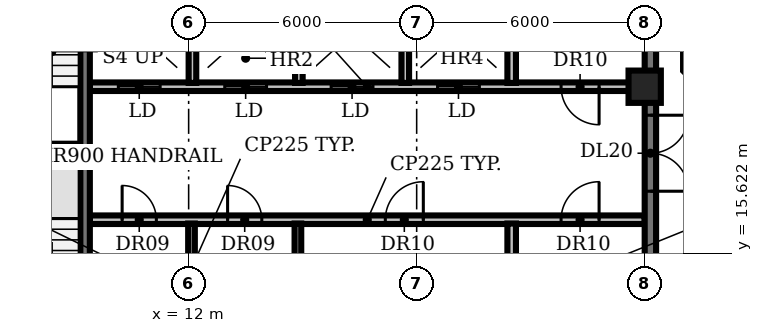
"""IFC4 building model, lengths in metres.
Left out: names, types, materials, properties, quantities, classifications, styles, units other than length and angle.
Written with IfcOpenShell. Run it as: python <this file> out.ifc"""

import sys

from ifc_helpers import new_model, si_unit, direction, frame, frame_2d, origin, origin_2d, place, context, subcontext, project, spatial, rectangle, circle, extrude, element, fill, save


model = new_model("IFC4")
c1 = context("Model", 3, precision=1e-05, world=origin(), true_north=direction((0.0, 1.0)))
c2 = subcontext(c1, "Body", "Model", "MODEL_VIEW")
j1 = project(units=[si_unit("LENGTHUNIT", "METRE"), si_unit("PLANEANGLEUNIT", "RADIAN")], contexts=[c1])
p1 = place(None, origin())
s1 = spatial("IfcSite", under=j1, at=p1, CompositionType="ELEMENT")
p2 = place(p1, origin())
s2 = spatial("IfcBuilding", under=s1, at=p2, CompositionType="ELEMENT")
p3 = place(p2, frame((0.0, 0.0, 272.6)))
s3 = spatial("IfcBuildingStorey", under=s2, at=p3, CompositionType="ELEMENT", Elevation=272.6)
p4 = place(p3, frame((24.0, 20.0, 0.0), z_axis=(0.0, 0.0, 1.0), x_axis=(1.0, 0.0, 0.0)))
e1 = element("IfcColumn", 1, at=p4, inside=s3, PredefinedType="COLUMN", context=c2, shape_type="SweptSolid", body=[
    extrude(circle(Radius=0.425, at=origin_2d()), origin(), (0.0, 0.0, 1.0), 3.85),
])
p5 = place(p3, frame((9.4, 16.5, 0.0), z_axis=(0.0, 0.0, 1.0), x_axis=(1.0, 0.0, 0.0)))
e2 = element("IfcWall", 2, at=p5, inside=s3, PredefinedType="PARTITIONING", context=c2, shape_type="SweptSolid", body=[
    extrude(rectangle(XDim=14.6, YDim=0.225, at=frame_2d((7.3, 0.0))), origin(), (0.0, 0.0, 1.0), 3.85),
])
p6 = place(p5, frame((0.85, 0.0, 0.0)))
e3 = element("IfcOpeningElement", 3, at=p6, cuts=e2, PredefinedType="OPENING", context=c2, shape_type="SweptSolid", body=[
    extrude(rectangle(XDim=0.9, YDim=2.1, at=frame_2d((0.45, 1.05))), frame((0.0, 0.123, 0.0), z_axis=(0.0, -1.0, 0.0), x_axis=(1.0, 0.0, 0.0)), (0.0, 0.0, 1.0), 0.245),
])
p7 = place(p5, frame((3.625, 0.0, 0.0)))
e4 = element("IfcOpeningElement", 4, at=p7, cuts=e2, PredefinedType="OPENING", context=c2, shape_type="SweptSolid", body=[
    extrude(rectangle(XDim=0.9, YDim=2.1, at=frame_2d((0.45, 1.05))), frame((0.0, 0.123, 0.0), z_axis=(0.0, -1.0, 0.0), x_axis=(1.0, 0.0, 0.0)), (0.0, 0.0, 1.0), 0.245),
])
p8 = place(p5, frame((7.775, 0.0, 0.0)))
e5 = element("IfcOpeningElement", 5, at=p8, cuts=e2, PredefinedType="OPENING", context=c2, shape_type="SweptSolid", body=[
    extrude(rectangle(XDim=1.0, YDim=2.1, at=frame_2d((0.5, 1.05))), frame((0.0, 0.123, 0.0), z_axis=(0.0, -1.0, 0.0), x_axis=(1.0, 0.0, 0.0)), (0.0, 0.0, 1.0), 0.245),
])
p9 = place(p5, frame((12.4, 0.0, 0.0)))
e6 = element("IfcOpeningElement", 6, at=p9, cuts=e2, PredefinedType="OPENING", context=c2, shape_type="SweptSolid", body=[
    extrude(rectangle(XDim=1.0, YDim=2.1, at=frame_2d((0.5, 1.05))), frame((0.0, 0.123, 0.0), z_axis=(0.0, -1.0, 0.0), x_axis=(1.0, 0.0, 0.0)), (0.0, 0.0, 1.0), 0.245),
])
p10 = place(p3, frame((6.0, 18.375, 0.0), z_axis=(0.0, 0.0, 1.0), x_axis=(1.0, 0.0, 0.0)))
e7 = element("IfcWall", 7, at=p10, inside=s3, PredefinedType="SHEAR", context=c2, shape_type="SweptSolid", body=[
    extrude(rectangle(XDim=3.15, YDim=0.25, at=frame_2d((1.575, 0.0))), origin(), (0.0, 0.0, 1.0), 3.85),
])
p11 = place(p3, frame((24.0, 20.0, 0.0), z_axis=(0.0, 0.0, 1.0), x_axis=(-1.0, 0.0, 0.0)))
e8 = element("IfcWall", 8, at=p11, inside=s3, PredefinedType="PARTITIONING", context=c2, shape_type="SweptSolid", body=[
    extrude(rectangle(XDim=14.6, YDim=0.225, at=frame_2d((7.3, 0.0))), origin(), (0.0, 0.0, 1.0), 3.85),
])
p12 = place(p11, frame((12.75, 0.0, 0.0)))
e9 = element("IfcOpeningElement", 9, at=p12, cuts=e8, PredefinedType="OPENING", context=c2, shape_type="SweptSolid", body=[
    extrude(rectangle(XDim=1.1, YDim=2.1, at=frame_2d((0.55, 1.05))), frame((0.0, 0.123, 0.0), z_axis=(0.0, -1.0, 0.0), x_axis=(1.0, 0.0, 0.0)), (0.0, 0.0, 1.0), 0.245),
])
p13 = place(p11, frame((9.95, 0.0, 0.0)))
e10 = element("IfcOpeningElement", 10, at=p13, cuts=e8, PredefinedType="OPENING", context=c2, shape_type="SweptSolid", body=[
    extrude(rectangle(XDim=1.1, YDim=2.1, at=frame_2d((0.55, 1.05))), frame((0.0, 0.123, 0.0), z_axis=(0.0, -1.0, 0.0), x_axis=(1.0, 0.0, 0.0)), (0.0, 0.0, 1.0), 0.245),
])
p14 = place(p11, frame((7.15, 0.0, 0.0)))
e11 = element("IfcOpeningElement", 11, at=p14, cuts=e8, PredefinedType="OPENING", context=c2, shape_type="SweptSolid", body=[
    extrude(rectangle(XDim=1.1, YDim=2.1, at=frame_2d((0.55, 1.05))), frame((0.0, 0.123, 0.0), z_axis=(0.0, -1.0, 0.0), x_axis=(1.0, 0.0, 0.0)), (0.0, 0.0, 1.0), 0.245),
])
p15 = place(p11, frame((4.35, 0.0, 0.0)))
e12 = element("IfcOpeningElement", 12, at=p15, cuts=e8, PredefinedType="OPENING", context=c2, shape_type="SweptSolid", body=[
    extrude(rectangle(XDim=1.1, YDim=2.1, at=frame_2d((0.55, 1.05))), frame((0.0, 0.123, 0.0), z_axis=(0.0, -1.0, 0.0), x_axis=(1.0, 0.0, 0.0)), (0.0, 0.0, 1.0), 0.245),
])
p16 = place(p11, frame((1.2, 0.0, 0.0)))
e13 = element("IfcOpeningElement", 13, at=p16, cuts=e8, PredefinedType="OPENING", context=c2, shape_type="SweptSolid", body=[
    extrude(rectangle(XDim=1.0, YDim=2.1, at=frame_2d((0.5, 1.05))), frame((0.0, 0.123, 0.0), z_axis=(0.0, -1.0, 0.0), x_axis=(1.0, 0.0, 0.0)), (0.0, 0.0, 1.0), 0.245),
])
p17 = place(p3, frame((9.275, 18.375, 0.0), z_axis=(0.0, 0.0, 1.0), x_axis=(0.0, -1.0, 0.0)))
e14 = element("IfcWall", 14, at=p17, inside=s3, PredefinedType="SHEAR", context=c2, shape_type="SweptSolid", body=[
    extrude(rectangle(XDim=6.55, YDim=0.25, at=frame_2d((3.275, 0.0))), origin(), (0.0, 0.0, 1.0), 3.85),
])
p18 = place(p17, frame((5.075, 0.0, 0.0)))
e15 = element("IfcOpeningElement", 15, at=p18, cuts=e14, PredefinedType="OPENING", context=c2, shape_type="SweptSolid", body=[
    extrude(rectangle(XDim=1.0, YDim=2.1, at=frame_2d((0.5, 1.05))), frame((0.0, 0.135, 0.0), z_axis=(0.0, -1.0, 0.0), x_axis=(1.0, 0.0, 0.0)), (0.0, 0.0, 1.0), 0.27),
])
p19 = place(p3, frame((9.275, 18.375, 0.0), z_axis=(0.0, 0.0, 1.0), x_axis=(0.0, 1.0, 0.0)))
e16 = element("IfcWall", 16, at=p19, inside=s3, PredefinedType="SHEAR", context=c2, shape_type="SweptSolid", body=[
    extrude(rectangle(XDim=6.425, YDim=0.25, at=frame_2d((3.212, 0.0))), origin(), (0.0, 0.0, 1.0), 3.85),
])
p20 = place(p3, frame((12.075, 13.8, 0.0), z_axis=(0.0, 0.0, 1.0), x_axis=(0.0, 1.0, 0.0)))
e17 = element("IfcWall", 17, at=p20, inside=s3, PredefinedType="PARTITIONING", context=c2, shape_type="SweptSolid", body=[
    extrude(rectangle(XDim=2.6, YDim=0.175, at=frame_2d((1.3, 0.0))), origin(), (0.0, 0.0, 1.0), 3.85),
])
p21 = place(p3, frame((12.1, 20.1, 0.0), z_axis=(0.0, 0.0, 1.0), x_axis=(0.0, 1.0, 0.0)))
e18 = element("IfcWall", 18, at=p21, inside=s3, PredefinedType="SOLIDWALL", context=c2, shape_type="SweptSolid", body=[
    extrude(rectangle(XDim=2.6, YDim=0.2, at=frame_2d((1.3, 0.0))), origin(), (0.0, 0.0, 1.0), 3.85),
])
p22 = place(p3, frame((14.875, 13.8, 0.0), z_axis=(0.0, 0.0, 1.0), x_axis=(0.0, 1.0, 0.0)))
e19 = element("IfcWall", 19, at=p22, inside=s3, PredefinedType="PARTITIONING", context=c2, shape_type="SweptSolid", body=[
    extrude(rectangle(XDim=2.6, YDim=0.175, at=frame_2d((1.3, 0.0))), origin(), (0.0, 0.0, 1.0), 3.85),
])
for number, where, z_axis, x_axis in (
    (20, (14.9, 20.1, 0.0), (0.0, 0.0, 1.0), (0.0, 1.0, 0.0)),
    (21, (17.7, 20.1, 0.0), (0.0, 0.0, 1.0), (0.0, 1.0, 0.0)),
):
    element("IfcWall", number, at=place(p3, frame(where, z_axis=z_axis, x_axis=x_axis)), inside=s3, PredefinedType="SOLIDWALL", context=c2, shape_type="SweptSolid", body=[
        extrude(rectangle(XDim=2.6, YDim=0.2, at=frame_2d((1.3, 0.0))), origin(), (0.0, 0.0, 1.0), 3.85),
    ])
for number, where, z_axis, x_axis in (
    (22, (20.5, 13.8, 0.0), (0.0, 0.0, 1.0), (0.0, 1.0, 0.0)),
    (23, (20.5, 20.1, 0.0), (0.0, 0.0, 1.0), (0.0, 1.0, 0.0)),
):
    element("IfcWall", number, at=place(p3, frame(where, z_axis=z_axis, x_axis=x_axis)), inside=s3, PredefinedType="PARTITIONING", context=c2, shape_type="SweptSolid", body=[
        extrude(rectangle(XDim=2.6, YDim=0.225, at=frame_2d((1.3, 0.0))), origin(), (0.0, 0.0, 1.0), 3.85),
    ])
p23 = place(p3, frame((24.15, 25.655, 0.0), z_axis=(0.0, 0.0, 1.0), x_axis=(0.0, -1.0, 0.0)))
e24 = element("IfcWall", 24, at=p23, inside=s3, PredefinedType="SHEAR", context=c2, shape_type="SweptSolid", body=[
    extrude(rectangle(XDim=20.555, YDim=0.3, at=frame_2d((10.277, 0.0))), origin(), (0.0, 0.0, 1.0), 3.85),
])
p24 = place(p23, frame((18.505, 0.0, 0.0)))
e25 = element("IfcOpeningElement", 25, at=p24, cuts=e24, PredefinedType="OPENING", context=c2, shape_type="SweptSolid", body=[
    extrude(rectangle(XDim=1.5, YDim=2.1, at=frame_2d((0.75, 1.05))), frame((0.0, 0.16, 0.0), z_axis=(0.0, -1.0, 0.0), x_axis=(1.0, 0.0, 0.0)), (0.0, 0.0, 1.0), 0.32),
])
p25 = place(p23, frame((12.405, 0.0, 0.0)))
e26 = element("IfcOpeningElement", 26, at=p25, cuts=e24, PredefinedType="OPENING", context=c2, shape_type="SweptSolid", body=[
    extrude(rectangle(XDim=0.9, YDim=2.1, at=frame_2d((0.45, 1.05))), frame((0.0, 0.16, 0.0), z_axis=(0.0, -1.0, 0.0), x_axis=(1.0, 0.0, 0.0)), (0.0, 0.0, 1.0), 0.32),
])
p26 = place(p23, frame((6.405, 0.0, 0.0)))
e27 = element("IfcOpeningElement", 27, at=p26, cuts=e24, PredefinedType="OPENING", context=c2, shape_type="SweptSolid", body=[
    extrude(rectangle(XDim=2.0, YDim=2.1, at=frame_2d((1.0, 1.05))), frame((0.0, 0.16, 0.0), z_axis=(0.0, -1.0, 0.0), x_axis=(1.0, 0.0, 0.0)), (0.0, 0.0, 1.0), 0.32),
])
p27 = place(p6, origin())
e28 = element("IfcDoor", 28, at=p27, inside=s3, OperationType="SINGLE_SWING_LEFT", PredefinedType="DOOR", context=c2, shape_type="SweptSolid", body=[
    extrude(rectangle(XDim=0.9, YDim=2.1, at=frame_2d((0.45, 1.05))), frame((0.0, 0.025, 0.0), z_axis=(0.0, -1.0, 0.0), x_axis=(1.0, 0.0, 0.0)), (0.0, 0.0, 1.0), 0.05),
])
fill(e3, e28)
p28 = place(p7, origin())
e29 = element("IfcDoor", 29, at=p28, inside=s3, OperationType="SINGLE_SWING_LEFT", PredefinedType="DOOR", context=c2, shape_type="SweptSolid", body=[
    extrude(rectangle(XDim=0.9, YDim=2.1, at=frame_2d((0.45, 1.05))), frame((0.0, 0.025, 0.0), z_axis=(0.0, -1.0, 0.0), x_axis=(1.0, 0.0, 0.0)), (0.0, 0.0, 1.0), 0.05),
])
fill(e4, e29)
p29 = place(p8, origin())
e30 = element("IfcDoor", 30, at=p29, inside=s3, OperationType="SINGLE_SWING_RIGHT", PredefinedType="DOOR", context=c2, shape_type="SweptSolid", body=[
    extrude(rectangle(XDim=1.0, YDim=2.1, at=frame_2d((0.5, 1.05))), frame((0.0, 0.025, 0.0), z_axis=(0.0, -1.0, 0.0), x_axis=(1.0, 0.0, 0.0)), (0.0, 0.0, 1.0), 0.05),
])
fill(e5, e30)
p30 = place(p9, origin())
e31 = element("IfcDoor", 31, at=p30, inside=s3, OperationType="SINGLE_SWING_RIGHT", PredefinedType="DOOR", context=c2, shape_type="SweptSolid", body=[
    extrude(rectangle(XDim=1.0, YDim=2.1, at=frame_2d((0.5, 1.05))), frame((0.0, 0.025, 0.0), z_axis=(0.0, -1.0, 0.0), x_axis=(1.0, 0.0, 0.0)), (0.0, 0.0, 1.0), 0.05),
])
fill(e6, e31)
p31 = place(p12, origin())
e32 = element("IfcDoor", 32, at=p31, inside=s3, OperationType="DOUBLE_DOOR_SLIDING", PredefinedType="DOOR", context=c2, shape_type="SweptSolid", body=[
    extrude(rectangle(XDim=1.1, YDim=2.1, at=frame_2d((0.55, 1.05))), frame((0.0, 0.025, 0.0), z_axis=(0.0, -1.0, 0.0), x_axis=(1.0, 0.0, 0.0)), (0.0, 0.0, 1.0), 0.05),
])
fill(e9, e32)
p32 = place(p13, origin())
e33 = element("IfcDoor", 33, at=p32, inside=s3, OperationType="DOUBLE_DOOR_SLIDING", PredefinedType="DOOR", context=c2, shape_type="SweptSolid", body=[
    extrude(rectangle(XDim=1.1, YDim=2.1, at=frame_2d((0.55, 1.05))), frame((0.0, 0.025, 0.0), z_axis=(0.0, -1.0, 0.0), x_axis=(1.0, 0.0, 0.0)), (0.0, 0.0, 1.0), 0.05),
])
fill(e10, e33)
p33 = place(p14, origin())
e34 = element("IfcDoor", 34, at=p33, inside=s3, OperationType="DOUBLE_DOOR_SLIDING", PredefinedType="DOOR", context=c2, shape_type="SweptSolid", body=[
    extrude(rectangle(XDim=1.1, YDim=2.1, at=frame_2d((0.55, 1.05))), frame((0.0, 0.025, 0.0), z_axis=(0.0, -1.0, 0.0), x_axis=(1.0, 0.0, 0.0)), (0.0, 0.0, 1.0), 0.05),
])
fill(e11, e34)
p34 = place(p15, origin())
e35 = element("IfcDoor", 35, at=p34, inside=s3, OperationType="DOUBLE_DOOR_SLIDING", PredefinedType="DOOR", context=c2, shape_type="SweptSolid", body=[
    extrude(rectangle(XDim=1.1, YDim=2.1, at=frame_2d((0.55, 1.05))), frame((0.0, 0.025, 0.0), z_axis=(0.0, -1.0, 0.0), x_axis=(1.0, 0.0, 0.0)), (0.0, 0.0, 1.0), 0.05),
])
fill(e12, e35)
p35 = place(p16, origin())
e36 = element("IfcDoor", 36, at=p35, inside=s3, OperationType="SINGLE_SWING_LEFT", PredefinedType="DOOR", context=c2, shape_type="SweptSolid", body=[
    extrude(rectangle(XDim=1.0, YDim=2.1, at=frame_2d((0.5, 1.05))), frame((0.0, 0.025, 0.0), z_axis=(0.0, -1.0, 0.0), x_axis=(1.0, 0.0, 0.0)), (0.0, 0.0, 1.0), 0.05),
])
fill(e13, e36)
p36 = place(p26, origin())
e37 = element("IfcDoor", 37, at=p36, inside=s3, OperationType="DOUBLE_DOOR_SINGLE_SWING", PredefinedType="DOOR", context=c2, shape_type="SweptSolid", body=[
    extrude(rectangle(XDim=2.0, YDim=2.1, at=frame_2d((1.0, 1.05))), frame((0.0, 0.025, 0.0), z_axis=(0.0, -1.0, 0.0), x_axis=(1.0, 0.0, 0.0)), (0.0, 0.0, 1.0), 0.05),
])
fill(e27, e37)
save(model, sys.argv[1])
